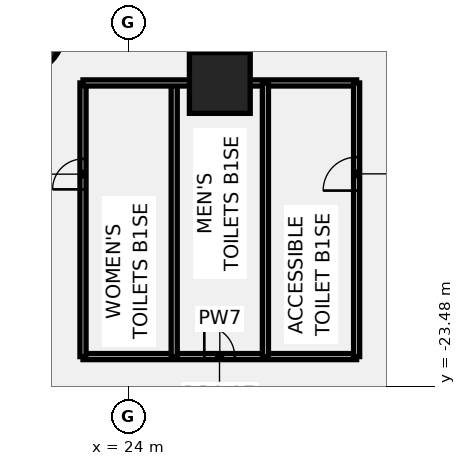
"""IFC4 building model, lengths in metres.
Left out: names, types, materials, properties, quantities, classifications, styles, units other than length and angle.
Written with IfcOpenShell. Run it as: python <this file> out.ifc"""

import sys

from ifc_helpers import new_model, si_unit, direction, frame, frame_2d, origin, origin_2d, place, context, subcontext, project, spatial, rectangle, circle, extrude, element, fill, save


model = new_model("IFC4")
c1 = context("Model", 3, precision=1e-05, world=origin(), true_north=direction((0.0, 1.0)))
c2 = subcontext(c1, "Body", "Model", "MODEL_VIEW")
j1 = project(units=[si_unit("LENGTHUNIT", "METRE"), si_unit("PLANEANGLEUNIT", "RADIAN")], contexts=[c1])
p1 = place(None, origin())
s1 = spatial("IfcSite", under=j1, at=p1, CompositionType="ELEMENT")
p2 = place(p1, origin())
s2 = spatial("IfcBuilding", under=s1, at=p2, CompositionType="ELEMENT")
p3 = place(p2, frame((0.0, 0.0, -7.0)))
s3 = spatial("IfcBuildingStorey", under=s2, at=p3, CompositionType="ELEMENT", Elevation=-7.0)
p4 = place(p3, frame((20.543, -11.86, -0.45), z_axis=(0.0, 0.0, 1.0), x_axis=(1.0, 0.0, 0.0)))
e1 = element("IfcColumn", 1, at=p4, inside=s3, PredefinedType="COLUMN", context=c2, shape_type="SweptSolid", body=[
    extrude(circle(Radius=1.3, at=origin_2d()), origin(), (0.0, 0.0, 1.0), 6.9),
])
p5 = place(p3, frame((27.0, -13.5, -0.45), z_axis=(0.0, 0.0, 1.0), x_axis=(1.0, 0.0, 0.0)))
e2 = element("IfcColumn", 2, at=p5, inside=s3, PredefinedType="COLUMN", context=c2, shape_type="SweptSolid", body=[
    extrude(rectangle(XDim=2.0, YDim=2.0, at=origin_2d()), origin(), (0.0, 0.0, 1.0), 6.9),
])
p6 = place(p3, frame((22.5, -22.5, 0.0), z_axis=(0.0, 0.0, 1.0), x_axis=(1.0, 0.0, 0.0)))
e3 = element("IfcWall", 3, at=p6, inside=s3, PredefinedType="PARTITIONING", context=c2, shape_type="SweptSolid", body=[
    extrude(rectangle(XDim=9.0, YDim=0.2, at=frame_2d((4.5, 0.0))), origin(), (0.0, 0.0, 1.0), 6.45),
])
p7 = place(p6, frame((3.99, 0.0, 0.0)))
e4 = element("IfcOpeningElement", 4, at=p7, cuts=e3, PredefinedType="OPENING", context=c2, shape_type="SweptSolid", body=[
    extrude(rectangle(XDim=1.0, YDim=2.1, at=frame_2d((0.5, 1.05))), frame((0.0, 0.11, 0.0), z_axis=(0.0, -1.0, 0.0), x_axis=(1.0, 0.0, 0.0)), (0.0, 0.0, 1.0), 0.22),
])
p8 = place(p3, frame((25.5, -22.5, 0.0), z_axis=(0.0, 0.0, 1.0), x_axis=(0.0, 1.0, 0.0)))
e5 = element("IfcWall", 5, at=p8, inside=s3, PredefinedType="PARTITIONING", context=c2, shape_type="SweptSolid", body=[
    extrude(rectangle(XDim=9.0, YDim=0.2, at=frame_2d((4.5, 0.0))), origin(), (0.0, 0.0, 1.0), 6.45),
])
p9 = place(p3, frame((22.5, -22.5, 0.0), z_axis=(0.0, 0.0, 1.0), x_axis=(0.0, 1.0, 0.0)))
e6 = element("IfcWall", 6, at=p9, inside=s3, PredefinedType="PARTITIONING", context=c2, shape_type="SweptSolid", body=[
    extrude(rectangle(XDim=9.0, YDim=0.2, at=frame_2d((4.5, 0.0))), origin(), (0.0, 0.0, 1.0), 6.45),
])
p10 = place(p9, frame((5.5, 0.0, 0.0)))
e7 = element("IfcOpeningElement", 7, at=p10, cuts=e6, PredefinedType="OPENING", context=c2, shape_type="SweptSolid", body=[
    extrude(rectangle(XDim=1.0, YDim=2.1, at=frame_2d((0.5, 1.05))), frame((0.0, 0.11, 0.0), z_axis=(0.0, -1.0, 0.0), x_axis=(1.0, 0.0, 0.0)), (0.0, 0.0, 1.0), 0.22),
])
p11 = place(p3, frame((22.5, -13.5, 0.0), z_axis=(0.0, 0.0, 1.0), x_axis=(1.0, 0.0, 0.0)))
e8 = element("IfcWall", 8, at=p11, inside=s3, PredefinedType="PARTITIONING", context=c2, shape_type="SweptSolid", body=[
    extrude(rectangle(XDim=9.0, YDim=0.2, at=frame_2d((4.5, 0.0))), origin(), (0.0, 0.0, 1.0), 6.45),
])
p12 = place(p3, frame((31.5, -22.5, 0.0), z_axis=(0.0, 0.0, 1.0), x_axis=(0.0, 1.0, 0.0)))
e9 = element("IfcWall", 9, at=p12, inside=s3, PredefinedType="PARTITIONING", context=c2, shape_type="SweptSolid", body=[
    extrude(rectangle(XDim=9.0, YDim=0.2, at=frame_2d((4.5, 0.0))), origin(), (0.0, 0.0, 1.0), 6.45),
])
p13 = place(p12, frame((5.46, 0.0, 0.0)))
e10 = element("IfcOpeningElement", 10, at=p13, cuts=e9, PredefinedType="OPENING", context=c2, shape_type="SweptSolid", body=[
    extrude(rectangle(XDim=1.1, YDim=2.1, at=frame_2d((0.55, 1.05))), frame((0.0, 0.11, 0.0), z_axis=(0.0, -1.0, 0.0), x_axis=(1.0, 0.0, 0.0)), (0.0, 0.0, 1.0), 0.22),
])
p14 = place(p3, frame((28.5, -22.5, 0.0), z_axis=(0.0, 0.0, 1.0), x_axis=(0.0, 1.0, 0.0)))
e11 = element("IfcWall", 11, at=p14, inside=s3, PredefinedType="PARTITIONING", context=c2, shape_type="SweptSolid", body=[
    extrude(rectangle(XDim=9.0, YDim=0.2, at=frame_2d((4.5, 0.0))), origin(), (0.0, 0.0, 1.0), 6.45),
])
p15 = place(p10, origin())
e12 = element("IfcDoor", 12, at=p15, inside=s3, OperationType="SINGLE_SWING_RIGHT", PredefinedType="DOOR", context=c2, shape_type="SweptSolid", body=[
    extrude(rectangle(XDim=1.0, YDim=2.1, at=frame_2d((0.5, 1.05))), frame((0.0, 0.025, 0.0), z_axis=(0.0, -1.0, 0.0), x_axis=(1.0, 0.0, 0.0)), (0.0, 0.0, 1.0), 0.05),
])
fill(e7, e12)
p16 = place(p7, origin())
e13 = element("IfcDoor", 13, at=p16, inside=s3, OperationType="SINGLE_SWING_LEFT", PredefinedType="DOOR", context=c2, shape_type="SweptSolid", body=[
    extrude(rectangle(XDim=1.0, YDim=2.1, at=frame_2d((0.5, 1.05))), frame((0.0, 0.025, 0.0), z_axis=(0.0, -1.0, 0.0), x_axis=(1.0, 0.0, 0.0)), (0.0, 0.0, 1.0), 0.05),
])
fill(e4, e13)
p17 = place(p13, origin())
e14 = element("IfcDoor", 14, at=p17, inside=s3, OperationType="SINGLE_SWING_RIGHT", PredefinedType="DOOR", context=c2, shape_type="SweptSolid", body=[
    extrude(rectangle(XDim=1.1, YDim=2.1, at=frame_2d((0.55, 1.05))), frame((0.0, 0.025, 0.0), z_axis=(0.0, -1.0, 0.0), x_axis=(1.0, 0.0, 0.0)), (0.0, 0.0, 1.0), 0.05),
])
fill(e10, e14)
save(model, sys.argv[1])
